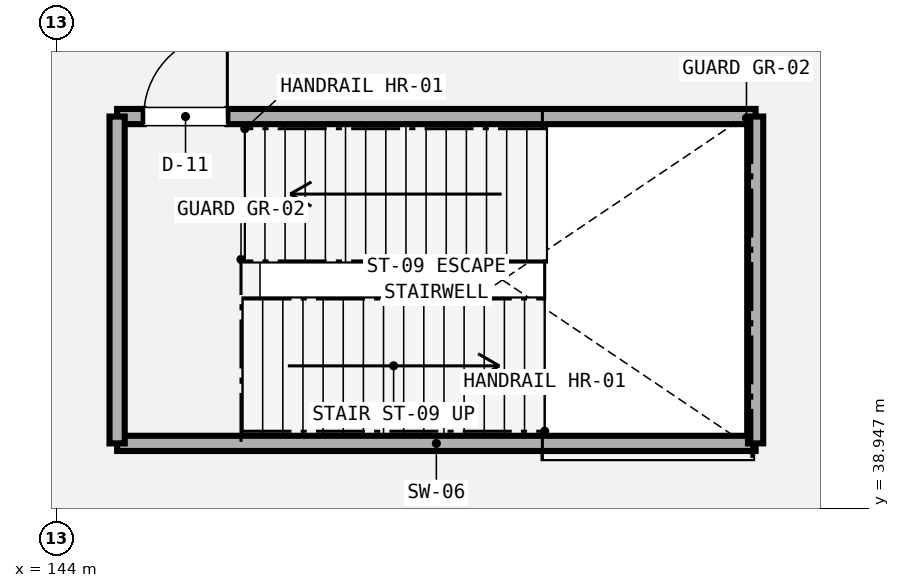
"""IFC4 building model, lengths in metres.
Left out: names, types, materials, properties, quantities, classifications, styles, units other than length and angle.
Written with IfcOpenShell. Run it as: python <this file> out.ifc"""

import sys

from ifc_helpers import new_model, si_unit, direction, frame, frame_2d, origin, place, context, subcontext, project, spatial, rectangle, extrude, element, fill, save


model = new_model("IFC4")
c1 = context("Model", 3, precision=1e-05, world=origin(), true_north=direction((0.0, 1.0)))
c2 = subcontext(c1, "Body", "Model", "MODEL_VIEW")
j1 = project(units=[si_unit("LENGTHUNIT", "METRE"), si_unit("PLANEANGLEUNIT", "RADIAN")], contexts=[c1])
p1 = place(None, origin())
s1 = spatial("IfcSite", under=j1, at=p1, CompositionType="ELEMENT")
p2 = place(p1, origin())
s2 = spatial("IfcBuilding", under=s1, at=p2, CompositionType="ELEMENT")
p3 = place(p2, origin())
s3 = spatial("IfcBuildingStorey", under=s2, at=p3, CompositionType="ELEMENT", Elevation=0.0)
p4 = place(p3, frame((144.8, 39.8, 0.0), z_axis=(0.0, 0.0, 1.0), x_axis=(1.0, 0.0, 0.0)))
e1 = element("IfcWall", 1, at=p4, inside=s3, PredefinedType="SHEAR", context=c2, shape_type="SweptSolid", body=[
    extrude(rectangle(XDim=8.4, YDim=0.2, at=frame_2d((4.2, 0.0))), origin(), (0.0, 0.0, 1.0), 5.08),
])
p5 = place(p3, frame((144.8, 44.1, 0.0), z_axis=(0.0, 0.0, 1.0), x_axis=(1.0, 0.0, 0.0)))
e2 = element("IfcWall", 2, at=p5, inside=s3, PredefinedType="SHEAR", context=c2, shape_type="SweptSolid", body=[
    extrude(rectangle(XDim=8.4, YDim=0.2, at=frame_2d((4.2, 0.0))), origin(), (0.0, 0.0, 1.0), 5.08),
])
p6 = place(p5, frame((0.35, 0.0, 0.0)))
e3 = element("IfcOpeningElement", 3, at=p6, cuts=e2, PredefinedType="OPENING", context=c2, shape_type="SweptSolid", body=[
    extrude(rectangle(XDim=1.1, YDim=2.2, at=frame_2d((0.55, 1.1))), frame((0.0, 0.11, 0.0), z_axis=(0.0, -1.0, 0.0), x_axis=(1.0, 0.0, 0.0)), (0.0, 0.0, 1.0), 0.22),
])
for number, where, z_axis, x_axis in (
    (4, (144.8, 39.8, 0.0), (0.0, 0.0, 1.0), (0.0, 1.0, 0.0)),
    (5, (153.2, 39.8, 0.0), (0.0, 0.0, 1.0), (0.0, 1.0, 0.0)),
):
    element("IfcWall", number, at=place(p3, frame(where, z_axis=z_axis, x_axis=x_axis)), inside=s3, PredefinedType="SHEAR", context=c2, shape_type="SweptSolid", body=[
        extrude(rectangle(XDim=4.3, YDim=0.2, at=frame_2d((2.15, 0.0))), origin(), (0.0, 0.0, 1.0), 5.08),
    ])
p7 = place(p6, origin())
e6 = element("IfcDoor", 6, at=p7, inside=s3, OperationType="SINGLE_SWING_RIGHT", PredefinedType="DOOR", context=c2, shape_type="SweptSolid", body=[
    extrude(rectangle(XDim=1.1, YDim=2.2, at=frame_2d((0.55, 1.1))), frame((0.0, 0.025, 0.0), z_axis=(0.0, -1.0, 0.0), x_axis=(1.0, 0.0, 0.0)), (0.0, 0.0, 1.0), 0.05),
])
fill(e3, e6)
save(model, sys.argv[1])
